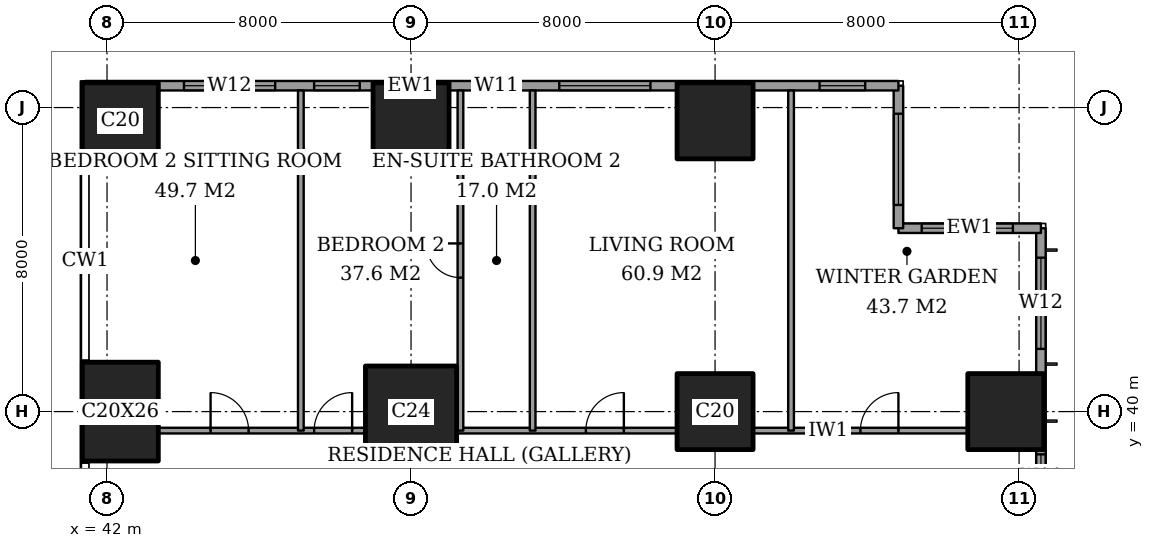
"""IFC4 building model, lengths in metres.
Left out: names, types, materials, properties, quantities, classifications, styles, units other than length and angle.
Written with IfcOpenShell. Run it as: python <this file> out.ifc"""

import sys

from ifc_helpers import new_model, si_unit, direction, frame, frame_2d, origin, origin_2d, place, context, subcontext, project, spatial, rectangle, extrude, element, fill, save


model = new_model("IFC4")
c1 = context("Model", 3, precision=1e-05, world=origin(), true_north=direction((0.0, 1.0)))
c2 = subcontext(c1, "Body", "Model", "MODEL_VIEW")
j1 = project(units=[si_unit("LENGTHUNIT", "METRE"), si_unit("PLANEANGLEUNIT", "RADIAN")], contexts=[c1])
p1 = place(None, origin())
s1 = spatial("IfcSite", under=j1, at=p1, CompositionType="ELEMENT")
p2 = place(p1, origin())
s2 = spatial("IfcBuilding", under=s1, at=p2, CompositionType="ELEMENT")
p3 = place(p2, frame((0.0, 0.0, 99.8)))
s3 = spatial("IfcBuildingStorey", under=s2, at=p3, CompositionType="ELEMENT", Elevation=99.8)
p4 = place(p3, frame((42.35, 40.0, 0.0), z_axis=(0.0, 0.0, 1.0), x_axis=(1.0, 0.0, 0.0)))
e1 = element("IfcColumn", 1, at=p4, inside=s3, PredefinedType="COLUMN", context=c2, shape_type="SweptSolid", body=[
    extrude(rectangle(XDim=2.0, YDim=2.6, at=origin_2d()), origin(), (0.0, 0.0, 1.0), 3.6),
])
p5 = place(p3, frame((42.35, 47.65, 0.0), z_axis=(0.0, 0.0, 1.0), x_axis=(1.0, 0.0, 0.0)))
e2 = element("IfcColumn", 2, at=p5, inside=s3, PredefinedType="COLUMN", context=c2, shape_type="SweptSolid", body=[
    extrude(rectangle(XDim=2.0, YDim=2.0, at=origin_2d()), origin(), (0.0, 0.0, 1.0), 3.6),
])
p6 = place(p3, frame((50.0, 40.0, 0.0), z_axis=(0.0, 0.0, 1.0), x_axis=(1.0, 0.0, 0.0)))
e3 = element("IfcColumn", 3, at=p6, inside=s3, PredefinedType="COLUMN", context=c2, shape_type="SweptSolid", body=[
    extrude(rectangle(XDim=2.4, YDim=2.4, at=origin_2d()), origin(), (0.0, 0.0, 1.0), 3.6),
])
for number, where, z_axis, x_axis in (
    (4, (50.0, 47.65, 0.0), (0.0, 0.0, 1.0), (1.0, 0.0, 0.0)),
    (5, (58.0, 40.0, 0.0), (0.0, 0.0, 1.0), (1.0, 0.0, 0.0)),
    (6, (58.0, 47.65, 0.0), (0.0, 0.0, 1.0), (1.0, 0.0, 0.0)),
    (7, (65.65, 40.0, 0.0), (0.0, 0.0, 1.0), (1.0, 0.0, 0.0)),
):
    element("IfcColumn", number, at=place(p3, frame(where, z_axis=z_axis, x_axis=x_axis)), inside=s3, PredefinedType="COLUMN", context=c2, shape_type="SweptSolid", body=[
        extrude(rectangle(XDim=2.0, YDim=2.0, at=origin_2d()), origin(), (0.0, 0.0, 1.0), 3.6),
    ])
p7 = place(p3, frame((66.575, 3.175, 0.0), z_axis=(0.0, 0.0, 1.0), x_axis=(0.0, 1.0, 0.0)))
e8 = element("IfcWall", 8, at=p7, inside=s3, PredefinedType="SOLIDWALL", context=c2, shape_type="SweptSolid", body=[
    extrude(rectangle(XDim=41.65, YDim=0.25, at=frame_2d((20.825, 0.0))), origin(), (0.0, 0.0, 1.0), 3.6),
])
p8 = place(p7, frame((0.775, 0.0, 0.4)))
e9 = element("IfcOpeningElement", 9, at=p8, cuts=e8, PredefinedType="OPENING", context=c2, shape_type="SweptSolid", body=[
    extrude(rectangle(XDim=2.4, YDim=2.2, at=frame_2d((1.2, 1.1))), frame((0.0, 0.135, 0.0), z_axis=(0.0, -1.0, 0.0), x_axis=(1.0, 0.0, 0.0)), (0.0, 0.0, 1.0), 0.27),
])
p9 = place(p7, frame((6.1, 0.0, 0.4)))
e10 = element("IfcOpeningElement", 10, at=p9, cuts=e8, PredefinedType="OPENING", context=c2, shape_type="SweptSolid", body=[
    extrude(rectangle(XDim=1.2, YDim=2.2, at=frame_2d((0.6, 1.1))), frame((0.0, 0.135, 0.0), z_axis=(0.0, -1.0, 0.0), x_axis=(1.0, 0.0, 0.0)), (0.0, 0.0, 1.0), 0.27),
])
p10 = place(p7, frame((8.275, 0.0, 0.4)))
e11 = element("IfcOpeningElement", 11, at=p10, cuts=e8, PredefinedType="OPENING", context=c2, shape_type="SweptSolid", body=[
    extrude(rectangle(XDim=2.4, YDim=2.2, at=frame_2d((1.2, 1.1))), frame((0.0, 0.135, 0.0), z_axis=(0.0, -1.0, 0.0), x_axis=(1.0, 0.0, 0.0)), (0.0, 0.0, 1.0), 0.27),
])
p11 = place(p7, frame((15.775, 0.0, 0.4)))
e12 = element("IfcOpeningElement", 12, at=p11, cuts=e8, PredefinedType="OPENING", context=c2, shape_type="SweptSolid", body=[
    extrude(rectangle(XDim=2.4, YDim=2.2, at=frame_2d((1.2, 1.1))), frame((0.0, 0.135, 0.0), z_axis=(0.0, -1.0, 0.0), x_axis=(1.0, 0.0, 0.0)), (0.0, 0.0, 1.0), 0.27),
])
p12 = place(p7, frame((23.475, 0.0, 0.4)))
e13 = element("IfcOpeningElement", 13, at=p12, cuts=e8, PredefinedType="OPENING", context=c2, shape_type="SweptSolid", body=[
    extrude(rectangle(XDim=2.4, YDim=2.2, at=frame_2d((1.2, 1.1))), frame((0.0, 0.135, 0.0), z_axis=(0.0, -1.0, 0.0), x_axis=(1.0, 0.0, 0.0)), (0.0, 0.0, 1.0), 0.27),
])
p13 = place(p7, frame((30.975, 0.0, 0.4)))
e14 = element("IfcOpeningElement", 14, at=p13, cuts=e8, PredefinedType="OPENING", context=c2, shape_type="SweptSolid", body=[
    extrude(rectangle(XDim=2.4, YDim=2.2, at=frame_2d((1.2, 1.1))), frame((0.0, 0.135, 0.0), z_axis=(0.0, -1.0, 0.0), x_axis=(1.0, 0.0, 0.0)), (0.0, 0.0, 1.0), 0.27),
])
p14 = place(p7, frame((34.5, 0.0, 0.4)))
e15 = element("IfcOpeningElement", 15, at=p14, cuts=e8, PredefinedType="OPENING", context=c2, shape_type="SweptSolid", body=[
    extrude(rectangle(XDim=1.2, YDim=2.2, at=frame_2d((0.6, 1.1))), frame((0.0, 0.135, 0.0), z_axis=(0.0, -1.0, 0.0), x_axis=(1.0, 0.0, 0.0)), (0.0, 0.0, 1.0), 0.27),
])
p15 = place(p7, frame((38.475, 0.0, 0.4)))
e16 = element("IfcOpeningElement", 16, at=p15, cuts=e8, PredefinedType="OPENING", context=c2, shape_type="SweptSolid", body=[
    extrude(rectangle(XDim=2.4, YDim=2.2, at=frame_2d((1.2, 1.1))), frame((0.0, 0.135, 0.0), z_axis=(0.0, -1.0, 0.0), x_axis=(1.0, 0.0, 0.0)), (0.0, 0.0, 1.0), 0.27),
])
p16 = place(p3, frame((66.575, 44.825, 0.0), z_axis=(0.0, 0.0, 1.0), x_axis=(-1.0, 0.0, 0.0)))
e17 = element("IfcWall", 17, at=p16, inside=s3, PredefinedType="SOLIDWALL", context=c2, shape_type="SweptSolid", body=[
    extrude(rectangle(XDim=3.75, YDim=0.25, at=frame_2d((1.875, 0.0))), origin(), (0.0, 0.0, 1.0), 3.6),
])
p17 = place(p16, frame((0.738, 0.0, 0.4)))
e18 = element("IfcOpeningElement", 18, at=p17, cuts=e17, PredefinedType="OPENING", context=c2, shape_type="SweptSolid", body=[
    extrude(rectangle(XDim=2.4, YDim=2.2, at=frame_2d((1.2, 1.1))), frame((0.0, 0.135, 0.0), z_axis=(0.0, -1.0, 0.0), x_axis=(1.0, 0.0, 0.0)), (0.0, 0.0, 1.0), 0.27),
])
p18 = place(p3, frame((62.825, 44.825, 0.0), z_axis=(0.0, 0.0, 1.0), x_axis=(0.0, 1.0, 0.0)))
e19 = element("IfcWall", 19, at=p18, inside=s3, PredefinedType="SOLIDWALL", context=c2, shape_type="SweptSolid", body=[
    extrude(rectangle(XDim=3.75, YDim=0.25, at=frame_2d((1.875, 0.0))), origin(), (0.0, 0.0, 1.0), 3.6),
])
p19 = place(p18, frame((0.613, 0.0, 0.4)))
e20 = element("IfcOpeningElement", 20, at=p19, cuts=e19, PredefinedType="OPENING", context=c2, shape_type="SweptSolid", body=[
    extrude(rectangle(XDim=2.4, YDim=2.2, at=frame_2d((1.2, 1.1))), frame((0.0, 0.135, 0.0), z_axis=(0.0, -1.0, 0.0), x_axis=(1.0, 0.0, 0.0)), (0.0, 0.0, 1.0), 0.27),
])
p20 = place(p3, frame((62.825, 48.575, 0.0), z_axis=(0.0, 0.0, 1.0), x_axis=(-1.0, 0.0, 0.0)))
e21 = element("IfcWall", 21, at=p20, inside=s3, PredefinedType="SOLIDWALL", context=c2, shape_type="SweptSolid", body=[
    extrude(rectangle(XDim=21.4, YDim=0.25, at=frame_2d((10.7, 0.0))), origin(), (0.0, 0.0, 1.0), 3.6),
])
p21 = place(p20, frame((0.875, 0.0, 0.4)))
e22 = element("IfcOpeningElement", 22, at=p21, cuts=e21, PredefinedType="OPENING", context=c2, shape_type="SweptSolid", body=[
    extrude(rectangle(XDim=1.2, YDim=2.2, at=frame_2d((0.6, 1.1))), frame((0.0, 0.135, 0.0), z_axis=(0.0, -1.0, 0.0), x_axis=(1.0, 0.0, 0.0)), (0.0, 0.0, 1.0), 0.27),
])
p22 = place(p20, frame((6.525, 0.0, 0.4)))
e23 = element("IfcOpeningElement", 23, at=p22, cuts=e21, PredefinedType="OPENING", context=c2, shape_type="SweptSolid", body=[
    extrude(rectangle(XDim=2.4, YDim=2.2, at=frame_2d((1.2, 1.1))), frame((0.0, 0.135, 0.0), z_axis=(0.0, -1.0, 0.0), x_axis=(1.0, 0.0, 0.0)), (0.0, 0.0, 1.0), 0.27),
])
p23 = place(p20, frame((9.975, 0.0, 0.4)))
e24 = element("IfcOpeningElement", 24, at=p23, cuts=e21, PredefinedType="OPENING", context=c2, shape_type="SweptSolid", body=[
    extrude(rectangle(XDim=1.2, YDim=2.2, at=frame_2d((0.6, 1.1))), frame((0.0, 0.135, 0.0), z_axis=(0.0, -1.0, 0.0), x_axis=(1.0, 0.0, 0.0)), (0.0, 0.0, 1.0), 0.27),
])
p24 = place(p20, frame((14.175, 0.0, 0.4)))
e25 = element("IfcOpeningElement", 25, at=p24, cuts=e21, PredefinedType="OPENING", context=c2, shape_type="SweptSolid", body=[
    extrude(rectangle(XDim=1.2, YDim=2.2, at=frame_2d((0.6, 1.1))), frame((0.0, 0.135, 0.0), z_axis=(0.0, -1.0, 0.0), x_axis=(1.0, 0.0, 0.0)), (0.0, 0.0, 1.0), 0.27),
])
p25 = place(p20, frame((16.4, 0.0, 0.4)))
e26 = element("IfcOpeningElement", 26, at=p25, cuts=e21, PredefinedType="OPENING", context=c2, shape_type="SweptSolid", body=[
    extrude(rectangle(XDim=2.4, YDim=2.2, at=frame_2d((1.2, 1.1))), frame((0.0, 0.135, 0.0), z_axis=(0.0, -1.0, 0.0), x_axis=(1.0, 0.0, 0.0)), (0.0, 0.0, 1.0), 0.27),
])
p26 = place(p3, frame((43.35, 39.5, 0.0), z_axis=(0.0, 0.0, 1.0), x_axis=(1.0, 0.0, 0.0)))
e27 = element("IfcWall", 27, at=p26, inside=s3, PredefinedType="PARTITIONING", context=c2, shape_type="SweptSolid", body=[
    extrude(rectangle(XDim=5.45, YDim=0.15, at=frame_2d((2.725, 0.0))), origin(), (0.0, 0.0, 1.0), 3.35),
])
p27 = place(p26, frame((4.1, 0.0, 0.0)))
e28 = element("IfcOpeningElement", 28, at=p27, cuts=e27, PredefinedType="OPENING", context=c2, shape_type="SweptSolid", body=[
    extrude(rectangle(XDim=1.0, YDim=2.1, at=frame_2d((0.5, 1.05))), frame((0.0, 0.085, 0.0), z_axis=(0.0, -1.0, 0.0), x_axis=(1.0, 0.0, 0.0)), (0.0, 0.0, 1.0), 0.17),
])
p28 = place(p26, frame((1.375, 0.0, 0.0)))
e29 = element("IfcOpeningElement", 29, at=p28, cuts=e27, PredefinedType="OPENING", context=c2, shape_type="SweptSolid", body=[
    extrude(rectangle(XDim=1.0, YDim=2.1, at=frame_2d((0.5, 1.05))), frame((0.0, 0.085, 0.0), z_axis=(0.0, -1.0, 0.0), x_axis=(1.0, 0.0, 0.0)), (0.0, 0.0, 1.0), 0.17),
])
p29 = place(p3, frame((51.2, 39.5, 0.0), z_axis=(0.0, 0.0, 1.0), x_axis=(1.0, 0.0, 0.0)))
e30 = element("IfcWall", 30, at=p29, inside=s3, PredefinedType="PARTITIONING", context=c2, shape_type="SweptSolid", body=[
    extrude(rectangle(XDim=5.8, YDim=0.15, at=frame_2d((2.9, 0.0))), origin(), (0.0, 0.0, 1.0), 3.35),
])
p30 = place(p29, frame((3.4, 0.0, 0.0)))
e31 = element("IfcOpeningElement", 31, at=p30, cuts=e30, PredefinedType="OPENING", context=c2, shape_type="SweptSolid", body=[
    extrude(rectangle(XDim=1.0, YDim=2.1, at=frame_2d((0.5, 1.05))), frame((0.0, 0.085, 0.0), z_axis=(0.0, -1.0, 0.0), x_axis=(1.0, 0.0, 0.0)), (0.0, 0.0, 1.0), 0.17),
])
p31 = place(p3, frame((59.0, 39.5, 0.0), z_axis=(0.0, 0.0, 1.0), x_axis=(1.0, 0.0, 0.0)))
e32 = element("IfcWall", 32, at=p31, inside=s3, PredefinedType="PARTITIONING", context=c2, shape_type="SweptSolid", body=[
    extrude(rectangle(XDim=5.65, YDim=0.15, at=frame_2d((2.825, 0.0))), origin(), (0.0, 0.0, 1.0), 3.35),
])
p32 = place(p31, frame((2.825, 0.0, 0.0)))
e33 = element("IfcOpeningElement", 33, at=p32, cuts=e32, PredefinedType="OPENING", context=c2, shape_type="SweptSolid", body=[
    extrude(rectangle(XDim=1.0, YDim=2.1, at=frame_2d((0.5, 1.05))), frame((0.0, 0.085, 0.0), z_axis=(0.0, -1.0, 0.0), x_axis=(1.0, 0.0, 0.0)), (0.0, 0.0, 1.0), 0.17),
])
p33 = place(p3, frame((47.1, 39.5, 0.0), z_axis=(0.0, 0.0, 1.0), x_axis=(0.0, 1.0, 0.0)))
e34 = element("IfcWall", 34, at=p33, inside=s3, PredefinedType="PARTITIONING", context=c2, shape_type="SweptSolid", body=[
    extrude(rectangle(XDim=8.95, YDim=0.15, at=frame_2d((4.475, 0.0))), origin(), (0.0, 0.0, 1.0), 3.35),
])
p34 = place(p3, frame((51.3, 39.5, 0.0), z_axis=(0.0, 0.0, 1.0), x_axis=(0.0, 1.0, 0.0)))
e35 = element("IfcWall", 35, at=p34, inside=s3, PredefinedType="PARTITIONING", context=c2, shape_type="SweptSolid", body=[
    extrude(rectangle(XDim=8.95, YDim=0.15, at=frame_2d((4.475, 0.0))), origin(), (0.0, 0.0, 1.0), 3.35),
])
p35 = place(p34, frame((4.025, 0.0, 0.0)))
e36 = element("IfcOpeningElement", 36, at=p35, cuts=e35, PredefinedType="OPENING", context=c2, shape_type="SweptSolid", body=[
    extrude(rectangle(XDim=0.9, YDim=2.1, at=frame_2d((0.45, 1.05))), frame((0.0, 0.085, 0.0), z_axis=(0.0, -1.0, 0.0), x_axis=(1.0, 0.0, 0.0)), (0.0, 0.0, 1.0), 0.17),
])
for number, where, z_axis, x_axis in (
    (37, (53.2, 39.5, 0.0), (0.0, 0.0, 1.0), (0.0, 1.0, 0.0)),
    (38, (60.0, 39.5, 0.0), (0.0, 0.0, 1.0), (0.0, 1.0, 0.0)),
):
    element("IfcWall", number, at=place(p3, frame(where, z_axis=z_axis, x_axis=x_axis)), inside=s3, PredefinedType="PARTITIONING", context=c2, shape_type="SweptSolid", body=[
        extrude(rectangle(XDim=8.95, YDim=0.15, at=frame_2d((4.475, 0.0))), origin(), (0.0, 0.0, 1.0), 3.35),
    ])
p36 = place(p14, origin())
e39 = element("IfcWindow", 39, at=p36, inside=s3, PartitioningType="SINGLE_PANEL", PredefinedType="WINDOW", context=c2, shape_type="SweptSolid", body=[
    extrude(rectangle(XDim=1.2, YDim=2.2, at=frame_2d((0.6, 1.1))), frame((0.0, 0.03, 0.0), z_axis=(0.0, -1.0, 0.0), x_axis=(1.0, 0.0, 0.0)), (0.0, 0.0, 1.0), 0.06),
])
fill(e15, e39)
p37 = place(p15, origin())
e40 = element("IfcWindow", 40, at=p37, inside=s3, PartitioningType="SINGLE_PANEL", PredefinedType="WINDOW", context=c2, shape_type="SweptSolid", body=[
    extrude(rectangle(XDim=2.4, YDim=2.2, at=frame_2d((1.2, 1.1))), frame((0.0, 0.03, 0.0), z_axis=(0.0, -1.0, 0.0), x_axis=(1.0, 0.0, 0.0)), (0.0, 0.0, 1.0), 0.06),
])
fill(e16, e40)
p38 = place(p17, origin())
e41 = element("IfcWindow", 41, at=p38, inside=s3, PartitioningType="SINGLE_PANEL", PredefinedType="WINDOW", context=c2, shape_type="SweptSolid", body=[
    extrude(rectangle(XDim=2.4, YDim=2.2, at=frame_2d((1.2, 1.1))), frame((0.0, 0.03, 0.0), z_axis=(0.0, -1.0, 0.0), x_axis=(1.0, 0.0, 0.0)), (0.0, 0.0, 1.0), 0.06),
])
fill(e18, e41)
p39 = place(p19, origin())
e42 = element("IfcWindow", 42, at=p39, inside=s3, PartitioningType="SINGLE_PANEL", PredefinedType="WINDOW", context=c2, shape_type="SweptSolid", body=[
    extrude(rectangle(XDim=2.4, YDim=2.2, at=frame_2d((1.2, 1.1))), frame((0.0, 0.03, 0.0), z_axis=(0.0, -1.0, 0.0), x_axis=(1.0, 0.0, 0.0)), (0.0, 0.0, 1.0), 0.06),
])
fill(e20, e42)
p40 = place(p21, origin())
e43 = element("IfcWindow", 43, at=p40, inside=s3, PartitioningType="SINGLE_PANEL", PredefinedType="WINDOW", context=c2, shape_type="SweptSolid", body=[
    extrude(rectangle(XDim=1.2, YDim=2.2, at=frame_2d((0.6, 1.1))), frame((0.0, 0.03, 0.0), z_axis=(0.0, -1.0, 0.0), x_axis=(1.0, 0.0, 0.0)), (0.0, 0.0, 1.0), 0.06),
])
fill(e22, e43)
p41 = place(p22, origin())
e44 = element("IfcWindow", 44, at=p41, inside=s3, PartitioningType="SINGLE_PANEL", PredefinedType="WINDOW", context=c2, shape_type="SweptSolid", body=[
    extrude(rectangle(XDim=2.4, YDim=2.2, at=frame_2d((1.2, 1.1))), frame((0.0, 0.03, 0.0), z_axis=(0.0, -1.0, 0.0), x_axis=(1.0, 0.0, 0.0)), (0.0, 0.0, 1.0), 0.06),
])
fill(e23, e44)
p42 = place(p23, origin())
e45 = element("IfcWindow", 45, at=p42, inside=s3, PartitioningType="SINGLE_PANEL", PredefinedType="WINDOW", context=c2, shape_type="SweptSolid", body=[
    extrude(rectangle(XDim=1.2, YDim=2.2, at=frame_2d((0.6, 1.1))), frame((0.0, 0.03, 0.0), z_axis=(0.0, -1.0, 0.0), x_axis=(1.0, 0.0, 0.0)), (0.0, 0.0, 1.0), 0.06),
])
fill(e24, e45)
p43 = place(p24, origin())
e46 = element("IfcWindow", 46, at=p43, inside=s3, PartitioningType="SINGLE_PANEL", PredefinedType="WINDOW", context=c2, shape_type="SweptSolid", body=[
    extrude(rectangle(XDim=1.2, YDim=2.2, at=frame_2d((0.6, 1.1))), frame((0.0, 0.03, 0.0), z_axis=(0.0, -1.0, 0.0), x_axis=(1.0, 0.0, 0.0)), (0.0, 0.0, 1.0), 0.06),
])
fill(e25, e46)
p44 = place(p25, origin())
e47 = element("IfcWindow", 47, at=p44, inside=s3, PartitioningType="SINGLE_PANEL", PredefinedType="WINDOW", context=c2, shape_type="SweptSolid", body=[
    extrude(rectangle(XDim=2.4, YDim=2.2, at=frame_2d((1.2, 1.1))), frame((0.0, 0.03, 0.0), z_axis=(0.0, -1.0, 0.0), x_axis=(1.0, 0.0, 0.0)), (0.0, 0.0, 1.0), 0.06),
])
fill(e26, e47)
p45 = place(p32, origin())
e48 = element("IfcDoor", 48, at=p45, inside=s3, OperationType="SINGLE_SWING_LEFT", PredefinedType="DOOR", context=c2, shape_type="SweptSolid", body=[
    extrude(rectangle(XDim=1.0, YDim=2.1, at=frame_2d((0.5, 1.05))), frame((0.0, 0.025, 0.0), z_axis=(0.0, -1.0, 0.0), x_axis=(1.0, 0.0, 0.0)), (0.0, 0.0, 1.0), 0.05),
])
fill(e33, e48)
p46 = place(p30, origin())
e49 = element("IfcDoor", 49, at=p46, inside=s3, OperationType="SINGLE_SWING_LEFT", PredefinedType="DOOR", context=c2, shape_type="SweptSolid", body=[
    extrude(rectangle(XDim=1.0, YDim=2.1, at=frame_2d((0.5, 1.05))), frame((0.0, 0.025, 0.0), z_axis=(0.0, -1.0, 0.0), x_axis=(1.0, 0.0, 0.0)), (0.0, 0.0, 1.0), 0.05),
])
fill(e31, e49)
p47 = place(p35, origin())
e50 = element("IfcDoor", 50, at=p47, inside=s3, OperationType="SINGLE_SWING_LEFT", PredefinedType="DOOR", context=c2, shape_type="SweptSolid", body=[
    extrude(rectangle(XDim=0.9, YDim=2.1, at=frame_2d((0.45, 1.05))), frame((0.0, 0.025, 0.0), z_axis=(0.0, -1.0, 0.0), x_axis=(1.0, 0.0, 0.0)), (0.0, 0.0, 1.0), 0.05),
])
fill(e36, e50)
p48 = place(p27, origin())
e51 = element("IfcDoor", 51, at=p48, inside=s3, OperationType="SINGLE_SWING_LEFT", PredefinedType="DOOR", context=c2, shape_type="SweptSolid", body=[
    extrude(rectangle(XDim=1.0, YDim=2.1, at=frame_2d((0.5, 1.05))), frame((0.0, 0.025, 0.0), z_axis=(0.0, -1.0, 0.0), x_axis=(1.0, 0.0, 0.0)), (0.0, 0.0, 1.0), 0.05),
])
fill(e28, e51)
p49 = place(p28, origin())
e52 = element("IfcDoor", 52, at=p49, inside=s3, OperationType="SINGLE_SWING_RIGHT", PredefinedType="DOOR", context=c2, shape_type="SweptSolid", body=[
    extrude(rectangle(XDim=1.0, YDim=2.1, at=frame_2d((0.5, 1.05))), frame((0.0, 0.025, 0.0), z_axis=(0.0, -1.0, 0.0), x_axis=(1.0, 0.0, 0.0)), (0.0, 0.0, 1.0), 0.05),
])
fill(e29, e52)
save(model, sys.argv[1])
